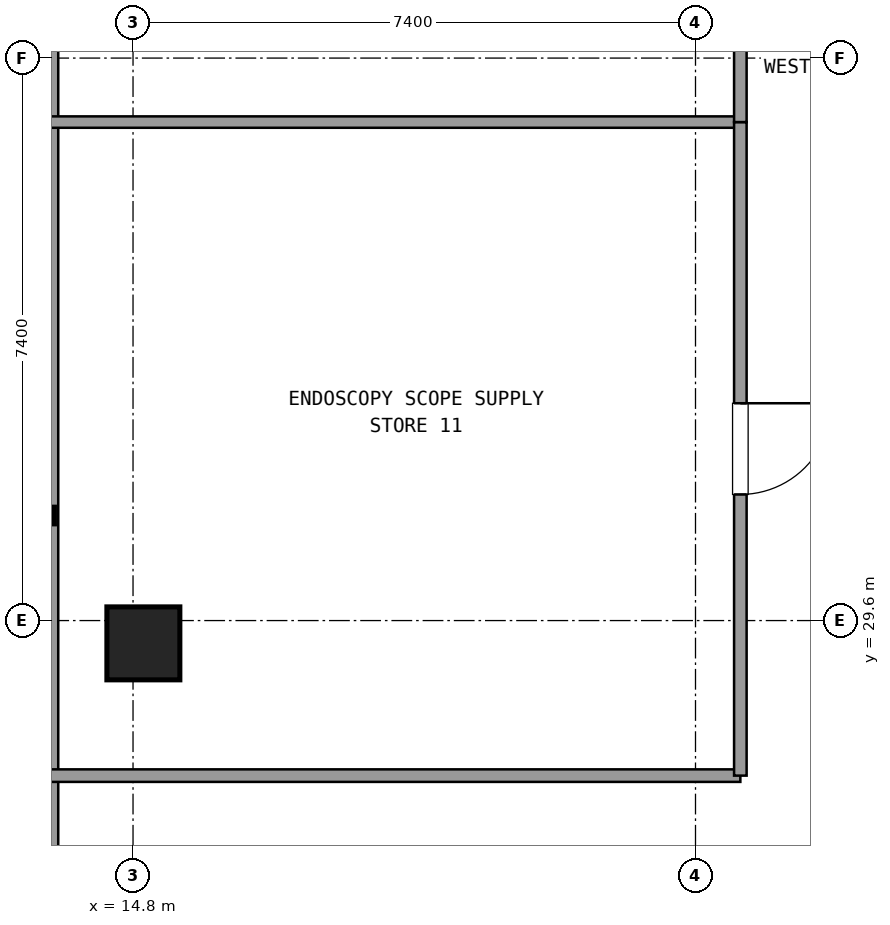
"""IFC4 building model, lengths in metres.
Left out: names, types, materials, properties, quantities, classifications, styles, units other than length and angle.
Written with IfcOpenShell. Run it as: python <this file> out.ifc"""

import sys

from ifc_helpers import new_model, si_unit, direction, frame, frame_2d, origin, origin_2d, place, context, subcontext, project, spatial, rectangle, extrude, element, fill, save


model = new_model("IFC4")
c1 = context("Model", 3, precision=1e-05, world=origin(), true_north=direction((0.0, 1.0)))
c2 = subcontext(c1, "Body", "Model", "MODEL_VIEW")
j1 = project(units=[si_unit("LENGTHUNIT", "METRE"), si_unit("PLANEANGLEUNIT", "RADIAN")], contexts=[c1])
p1 = place(None, origin())
s1 = spatial("IfcSite", under=j1, at=p1, CompositionType="ELEMENT")
p2 = place(p1, origin())
s2 = spatial("IfcBuilding", under=s1, at=p2, CompositionType="ELEMENT")
p3 = place(p2, frame((0.0, 0.0, 174.42)))
s3 = spatial("IfcBuildingStorey", under=s2, at=p3, CompositionType="ELEMENT", Elevation=174.42)
p4 = place(p3, frame((14.936, 29.3, 0.0), z_axis=(0.0, 0.0, 1.0), x_axis=(1.0, 0.0, 0.0)))
e1 = element("IfcColumn", 1, at=p4, inside=s3, PredefinedType="COLUMN", context=c2, shape_type="SweptSolid", body=[
    extrude(rectangle(XDim=0.96, YDim=0.96, at=origin_2d()), origin(), (0.0, 0.0, 1.0), 3.579),
])
p5 = place(p3, frame((13.696, 41.145, 0.0), z_axis=(0.0, 0.0, 1.0), x_axis=(0.0, -1.0, 0.0)))
e2 = element("IfcWall", 2, at=p5, inside=s3, PredefinedType="SOLIDWALL", context=c2, shape_type="SweptSolid", body=[
    extrude(rectangle(XDim=30.49, YDim=0.24, at=frame_2d((15.245, 0.0))), origin(), (0.0, 0.0, 1.0), 0.85),
])
p6 = place(p3, frame((13.716, 27.56, 0.0), z_axis=(0.0, 0.0, 1.0), x_axis=(1.0, 0.0, 0.0)))
e3 = element("IfcWall", 3, at=p6, inside=s3, PredefinedType="PARTITIONING", context=c2, shape_type="SweptSolid", body=[
    extrude(rectangle(XDim=9.074, YDim=0.165, at=frame_2d((4.537, 0.0))), origin(), (0.0, 0.0, 1.0), 2.59),
])
p7 = place(p3, frame((22.79, 36.158, 0.0), z_axis=(0.0, 0.0, 1.0), x_axis=(-1.0, 0.0, 0.0)))
e4 = element("IfcWall", 4, at=p7, inside=s3, PredefinedType="PARTITIONING", context=c2, shape_type="SweptSolid", body=[
    extrude(rectangle(XDim=9.074, YDim=0.15, at=frame_2d((4.537, 0.0))), origin(), (0.0, 0.0, 1.0), 2.59),
])
p8 = place(p3, frame((22.79, 27.56, 0.0), z_axis=(0.0, 0.0, 1.0), x_axis=(0.0, 1.0, 0.0)))
e5 = element("IfcWall", 5, at=p8, inside=s3, PredefinedType="PARTITIONING", context=c2, shape_type="SweptSolid", body=[
    extrude(rectangle(XDim=8.598, YDim=0.165, at=frame_2d((4.299, 0.0))), origin(), (0.0, 0.0, 1.0), 2.59),
])
p9 = place(p8, frame((3.699, 0.0, 0.0)))
e6 = element("IfcOpeningElement", 6, at=p9, cuts=e5, PredefinedType="OPENING", context=c2, shape_type="SweptSolid", body=[
    extrude(rectangle(XDim=1.2, YDim=2.15, at=frame_2d((0.6, 1.075))), frame((0.0, 0.093, 0.0), z_axis=(0.0, -1.0, 0.0), x_axis=(1.0, 0.0, 0.0)), (0.0, 0.0, 1.0), 0.185),
])
p10 = place(p3, frame((22.79, 36.158, 0.0), z_axis=(0.0, 0.0, 1.0), x_axis=(0.0, 1.0, 0.0)))
e7 = element("IfcWall", 7, at=p10, inside=s3, PredefinedType="PARTITIONING", context=c2, shape_type="SweptSolid", body=[
    extrude(rectangle(XDim=10.942, YDim=0.165, at=frame_2d((5.471, 0.0))), origin(), (0.0, 0.0, 1.0), 2.59),
])
p11 = place(p10, frame((4.871, 0.0, 0.0)))
e8 = element("IfcOpeningElement", 8, at=p11, cuts=e7, PredefinedType="OPENING", context=c2, shape_type="SweptSolid", body=[
    extrude(rectangle(XDim=1.2, YDim=2.15, at=frame_2d((0.6, 1.075))), frame((0.0, 0.093, 0.0), z_axis=(0.0, -1.0, 0.0), x_axis=(1.0, 0.0, 0.0)), (0.0, 0.0, 1.0), 0.185),
])
p12 = place(p9, frame((1.2, 0.0, 0.0), z_axis=(0.0, 0.0, 1.0), x_axis=(-1.0, 0.0, 0.0)))
e9 = element("IfcDoor", 9, at=p12, inside=s3, OperationType="SINGLE_SWING_RIGHT", PredefinedType="DOOR", context=c2, shape_type="SweptSolid", body=[
    extrude(rectangle(XDim=1.2, YDim=2.15, at=frame_2d((0.6, 1.075))), frame((0.0, 0.025, 0.0), z_axis=(0.0, -1.0, 0.0), x_axis=(1.0, 0.0, 0.0)), (0.0, 0.0, 1.0), 0.05),
])
fill(e6, e9)
save(model, sys.argv[1])
